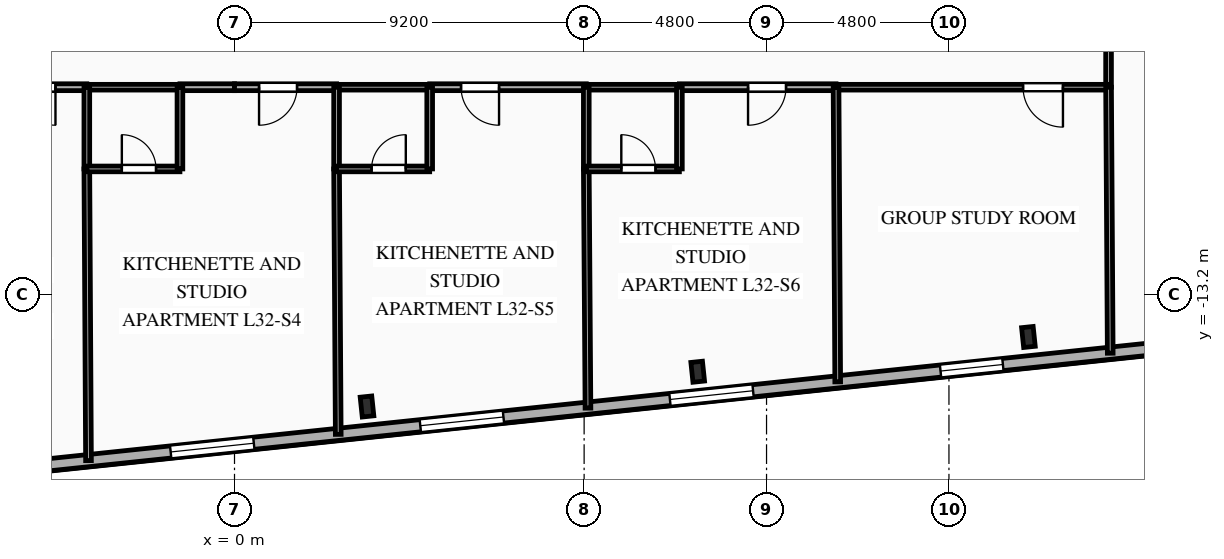
"""IFC4 building model, lengths in metres.
Left out: names, types, materials, properties, quantities, classifications, styles, units other than length and angle.
Written with IfcOpenShell. Run it as: python <this file> out.ifc"""

import sys

from ifc_helpers import new_model, si_unit, direction, frame, frame_2d, origin, origin_2d, place, context, subcontext, project, spatial, rectangle, i_section, extrude, element, fill, save


model = new_model("IFC4")
c1 = context("Model", 3, precision=1e-05, world=origin(), true_north=direction((0.0, 1.0)))
c2 = subcontext(c1, "Body", "Model", "MODEL_VIEW")
j1 = project(units=[si_unit("LENGTHUNIT", "METRE"), si_unit("PLANEANGLEUNIT", "RADIAN")], contexts=[c1])
p1 = place(None, origin())
s1 = spatial("IfcSite", under=j1, at=p1, CompositionType="ELEMENT")
p2 = place(p1, origin())
s2 = spatial("IfcBuilding", under=s1, at=p2, CompositionType="ELEMENT")
p3 = place(p2, frame((0.0, 0.0, 115.85)))
s3 = spatial("IfcBuildingStorey", under=s2, at=p3, CompositionType="ELEMENT", Elevation=115.85)
for number, where, z_axis, x_axis in (
    (1, (3.487, -16.151, 0.0), (0.0, 0.0, 1.0), (0.995, 0.105, 0.0)),
    (2, (12.189, -15.237, 0.0), (0.0, 0.0, 1.0), (0.995, 0.105, 0.0)),
    (3, (20.891, -14.322, 0.0), (0.0, 0.0, 1.0), (0.995, 0.105, 0.0)),
):
    element("IfcColumn", number, at=place(p3, frame(where, z_axis=z_axis, x_axis=x_axis)), inside=s3, PredefinedType="COLUMN", context=c2, shape_type="SweptSolid", body=[
        extrude(i_section(OverallWidth=0.306, OverallDepth=0.524, WebThickness=0.021, FlangeThickness=0.04, FilletRadius=0.027, at=origin_2d()), origin(), (0.0, 0.0, 1.0), 3.35),
    ])
p4 = place(p3, frame((30.307, -13.986, 0.0), z_axis=(0.0, 0.0, 1.0), x_axis=(-0.994521628355, -0.104531003701, 0.0)))
e4 = element("IfcWall", 4, at=p4, inside=s3, PredefinedType="SOLIDWALL", context=c2, shape_type="SweptSolid", body=[
    extrude(rectangle(XDim=53.8, YDim=0.32, at=frame_2d((26.9, 0.0))), origin(), (0.0, 0.0, 1.0), 3.045),
])
p5 = place(p4, frame((3.098, 0.0, 0.85)))
e5 = element("IfcOpeningElement", 5, at=p5, cuts=e4, PredefinedType="OPENING", context=c2, shape_type="SweptSolid", body=[
    extrude(rectangle(XDim=1.65, YDim=1.85, at=frame_2d((0.825, 0.925))), frame((0.0, 0.17, 0.0), z_axis=(0.0, -1.0, 0.0), x_axis=(1.0, 0.0, 0.0)), (0.0, 0.0, 1.0), 0.34),
])
p6 = place(p4, frame((10.143, 0.0, 0.85)))
e6 = element("IfcOpeningElement", 6, at=p6, cuts=e4, PredefinedType="OPENING", context=c2, shape_type="SweptSolid", body=[
    extrude(rectangle(XDim=1.65, YDim=1.85, at=frame_2d((0.825, 0.925))), frame((0.0, 0.17, 0.0), z_axis=(0.0, -1.0, 0.0), x_axis=(1.0, 0.0, 0.0)), (0.0, 0.0, 1.0), 0.34),
])
p7 = place(p4, frame((16.753, 0.0, 0.85)))
e7 = element("IfcOpeningElement", 7, at=p7, cuts=e4, PredefinedType="OPENING", context=c2, shape_type="SweptSolid", body=[
    extrude(rectangle(XDim=2.2, YDim=1.85, at=frame_2d((1.1, 0.925))), frame((0.0, 0.17, 0.0), z_axis=(0.0, -1.0, 0.0), x_axis=(1.0, 0.0, 0.0)), (0.0, 0.0, 1.0), 0.34),
])
p8 = place(p4, frame((23.358, 0.0, 0.85)))
e8 = element("IfcOpeningElement", 8, at=p8, cuts=e4, PredefinedType="OPENING", context=c2, shape_type="SweptSolid", body=[
    extrude(rectangle(XDim=2.2, YDim=1.85, at=frame_2d((1.1, 0.925))), frame((0.0, 0.17, 0.0), z_axis=(0.0, -1.0, 0.0), x_axis=(1.0, 0.0, 0.0)), (0.0, 0.0, 1.0), 0.34),
])
p9 = place(p4, frame((29.963, 0.0, 0.85)))
e9 = element("IfcOpeningElement", 9, at=p9, cuts=e4, PredefinedType="OPENING", context=c2, shape_type="SweptSolid", body=[
    extrude(rectangle(XDim=2.2, YDim=1.85, at=frame_2d((1.1, 0.925))), frame((0.0, 0.17, 0.0), z_axis=(0.0, -1.0, 0.0), x_axis=(1.0, 0.0, 0.0)), (0.0, 0.0, 1.0), 0.34),
])
p10 = place(p4, frame((36.568, 0.0, 0.85)))
e10 = element("IfcOpeningElement", 10, at=p10, cuts=e4, PredefinedType="OPENING", context=c2, shape_type="SweptSolid", body=[
    extrude(rectangle(XDim=2.2, YDim=1.85, at=frame_2d((1.1, 0.925))), frame((0.0, 0.17, 0.0), z_axis=(0.0, -1.0, 0.0), x_axis=(1.0, 0.0, 0.0)), (0.0, 0.0, 1.0), 0.34),
])
p11 = place(p4, frame((43.173, 0.0, 0.85)))
e11 = element("IfcOpeningElement", 11, at=p11, cuts=e4, PredefinedType="OPENING", context=c2, shape_type="SweptSolid", body=[
    extrude(rectangle(XDim=2.2, YDim=1.85, at=frame_2d((1.1, 0.925))), frame((0.0, 0.17, 0.0), z_axis=(0.0, -1.0, 0.0), x_axis=(1.0, 0.0, 0.0)), (0.0, 0.0, 1.0), 0.34),
])
p12 = place(p4, frame((49.653, 0.0, 0.85)))
e12 = element("IfcOpeningElement", 12, at=p12, cuts=e4, PredefinedType="OPENING", context=c2, shape_type="SweptSolid", body=[
    extrude(rectangle(XDim=1.65, YDim=1.85, at=frame_2d((0.825, 0.925))), frame((0.0, 0.17, 0.0), z_axis=(0.0, -1.0, 0.0), x_axis=(1.0, 0.0, 0.0)), (0.0, 0.0, 1.0), 0.34),
])
p13 = place(p3, frame((-3.886, -7.75, 0.0), z_axis=(0.0, 0.0, 1.0), x_axis=(-1.0, 0.0, 0.0)))
e13 = element("IfcWall", 13, at=p13, inside=s3, PredefinedType="PARTITIONING", context=c2, shape_type="SweptSolid", body=[
    extrude(rectangle(XDim=4.121, YDim=0.18, at=frame_2d((2.061, 0.0))), origin(), (0.0, 0.0, 1.0), 3.045),
])
p14 = place(p13, frame((0.825, 0.0, 0.0)))
e14 = element("IfcOpeningElement", 14, at=p14, cuts=e13, PredefinedType="OPENING", context=c2, shape_type="SweptSolid", body=[
    extrude(rectangle(XDim=1.0, YDim=2.15, at=frame_2d((0.5, 1.075))), frame((0.0, 0.1, 0.0), z_axis=(0.0, -1.0, 0.0), x_axis=(1.0, 0.0, 0.0)), (0.0, 0.0, 1.0), 0.2),
])
p15 = place(p3, frame((0.0, -7.75, 0.0), z_axis=(0.0, 0.0, 1.0), x_axis=(-1.0, 0.0, 0.0)))
e15 = element("IfcWall", 15, at=p15, inside=s3, PredefinedType="PARTITIONING", context=c2, shape_type="SweptSolid", body=[
    extrude(rectangle(XDim=1.436, YDim=0.18, at=frame_2d((0.718, 0.0))), origin(), (0.0, 0.0, 1.0), 3.045),
])
p16 = place(p3, frame((-1.436, -7.75, 0.0), z_axis=(0.0, 0.0, 1.0), x_axis=(-1.0, 0.0, 0.0)))
e16 = element("IfcWall", 16, at=p16, inside=s3, PredefinedType="PLUMBINGWALL", context=c2, shape_type="SweptSolid", body=[
    extrude(rectangle(XDim=2.45, YDim=0.15, at=frame_2d((1.225, 0.0))), origin(), (0.0, 0.0, 1.0), 3.045),
])
p17 = place(p3, frame((23.0, -5.6, 0.0), z_axis=(0.0, 0.0, 1.0), x_axis=(0.0, -1.0, 0.0)))
e17 = element("IfcWall", 17, at=p17, inside=s3, PredefinedType="PARTITIONING", context=c2, shape_type="SweptSolid", body=[
    extrude(rectangle(XDim=2.15, YDim=0.15, at=frame_2d((1.075, 0.0))), origin(), (0.0, 0.0, 1.0), 3.045),
])
p18 = place(p3, frame((2.686, -7.75, 0.0), z_axis=(0.0, 0.0, 1.0), x_axis=(-1.0, 0.0, 0.0)))
e18 = element("IfcWall", 18, at=p18, inside=s3, PredefinedType="PARTITIONING", context=c2, shape_type="SweptSolid", body=[
    extrude(rectangle(XDim=2.686, YDim=0.18, at=frame_2d((1.343, 0.0))), origin(), (0.0, 0.0, 1.0), 3.045),
])
p19 = place(p18, frame((1.04, 0.0, 0.0)))
e19 = element("IfcOpeningElement", 19, at=p19, cuts=e18, PredefinedType="OPENING", context=c2, shape_type="SweptSolid", body=[
    extrude(rectangle(XDim=1.0, YDim=2.15, at=frame_2d((0.5, 1.075))), frame((0.0, 0.1, 0.0), z_axis=(0.0, -1.0, 0.0), x_axis=(1.0, 0.0, 0.0)), (0.0, 0.0, 1.0), 0.2),
])
p20 = place(p3, frame((9.257, -7.75, 0.0), z_axis=(0.0, 0.0, 1.0), x_axis=(-1.0, 0.0, 0.0)))
e20 = element("IfcWall", 20, at=p20, inside=s3, PredefinedType="PARTITIONING", context=c2, shape_type="SweptSolid", body=[
    extrude(rectangle(XDim=4.121, YDim=0.18, at=frame_2d((2.061, 0.0))), origin(), (0.0, 0.0, 1.0), 3.045),
])
p21 = place(p20, frame((2.296, 0.0, 0.0)))
e21 = element("IfcOpeningElement", 21, at=p21, cuts=e20, PredefinedType="OPENING", context=c2, shape_type="SweptSolid", body=[
    extrude(rectangle(XDim=1.0, YDim=2.15, at=frame_2d((0.5, 1.075))), frame((0.0, 0.1, 0.0), z_axis=(0.0, -1.0, 0.0), x_axis=(1.0, 0.0, 0.0)), (0.0, 0.0, 1.0), 0.2),
])
p22 = place(p3, frame((5.136, -7.75, 0.0), z_axis=(0.0, 0.0, 1.0), x_axis=(-1.0, 0.0, 0.0)))
e22 = element("IfcWall", 22, at=p22, inside=s3, PredefinedType="PLUMBINGWALL", context=c2, shape_type="SweptSolid", body=[
    extrude(rectangle(XDim=2.45, YDim=0.15, at=frame_2d((1.225, 0.0))), origin(), (0.0, 0.0, 1.0), 3.045),
])
p23 = place(p3, frame((15.829, -7.75, 0.0), z_axis=(0.0, 0.0, 1.0), x_axis=(-1.0, 0.0, 0.0)))
e23 = element("IfcWall", 23, at=p23, inside=s3, PredefinedType="PARTITIONING", context=c2, shape_type="SweptSolid", body=[
    extrude(rectangle(XDim=4.122, YDim=0.18, at=frame_2d((2.061, 0.0))), origin(), (0.0, 0.0, 1.0), 3.045),
])
p24 = place(p23, frame((1.316, 0.0, 0.0)))
e24 = element("IfcOpeningElement", 24, at=p24, cuts=e23, PredefinedType="OPENING", context=c2, shape_type="SweptSolid", body=[
    extrude(rectangle(XDim=1.0, YDim=2.15, at=frame_2d((0.5, 1.075))), frame((0.0, 0.1, 0.0), z_axis=(0.0, -1.0, 0.0), x_axis=(1.0, 0.0, 0.0)), (0.0, 0.0, 1.0), 0.2),
])
p25 = place(p3, frame((11.707, -7.75, 0.0), z_axis=(0.0, 0.0, 1.0), x_axis=(-1.0, 0.0, 0.0)))
e25 = element("IfcWall", 25, at=p25, inside=s3, PredefinedType="PLUMBINGWALL", context=c2, shape_type="SweptSolid", body=[
    extrude(rectangle(XDim=2.45, YDim=0.15, at=frame_2d((1.225, 0.0))), origin(), (0.0, 0.0, 1.0), 3.045),
])
p26 = place(p3, frame((23.0, -7.75, 0.0), z_axis=(0.0, 0.0, 1.0), x_axis=(-1.0, 0.0, 0.0)))
e26 = element("IfcWall", 26, at=p26, inside=s3, PredefinedType="PARTITIONING", context=c2, shape_type="SweptSolid", body=[
    extrude(rectangle(XDim=7.171, YDim=0.15, at=frame_2d((3.585, 0.0))), origin(), (0.0, 0.0, 1.0), 3.045),
])
p27 = place(p26, frame((1.2, 0.0, 0.0)))
e27 = element("IfcOpeningElement", 27, at=p27, cuts=e26, PredefinedType="OPENING", context=c2, shape_type="SweptSolid", body=[
    extrude(rectangle(XDim=1.05, YDim=2.15, at=frame_2d((0.525, 1.075))), frame((0.0, 0.085, 0.0), z_axis=(0.0, -1.0, 0.0), x_axis=(1.0, 0.0, 0.0)), (0.0, 0.0, 1.0), 0.17),
])
p28 = place(p3, frame((23.044, -14.749, 0.0), z_axis=(0.0, 0.0, 1.0), x_axis=(-0.006278653971, 0.999980289058, 0.0)))
e28 = element("IfcWall", 28, at=p28, inside=s3, PredefinedType="PARTITIONING", context=c2, shape_type="SweptSolid", body=[
    extrude(rectangle(XDim=6.999, YDim=0.15, at=frame_2d((3.5, 0.0))), origin(), (0.0, 0.0, 1.0), 3.045),
])
p29 = place(p3, frame((-3.886, -9.9, 0.0), z_axis=(0.0, 0.0, 1.0), x_axis=(0.005725643334, -0.99998360837, 0.0)))
e29 = element("IfcWall", 29, at=p29, inside=s3, PredefinedType="PARTITIONING", context=c2, shape_type="SweptSolid", body=[
    extrude(rectangle(XDim=7.675, YDim=0.15, at=frame_2d((3.838, 0.0))), origin(), (0.0, 0.0, 1.0), 3.045),
])
p30 = place(p3, frame((-3.886, -7.75, 0.0), z_axis=(0.0, 0.0, 1.0), x_axis=(0.0, -1.0, 0.0)))
e30 = element("IfcWall", 30, at=p30, inside=s3, PredefinedType="PLUMBINGWALL", context=c2, shape_type="SweptSolid", body=[
    extrude(rectangle(XDim=2.15, YDim=0.15, at=frame_2d((1.075, 0.0))), origin(), (0.0, 0.0, 1.0), 3.045),
])
p31 = place(p3, frame((-3.886, -9.9, 0.0), z_axis=(0.0, 0.0, 1.0), x_axis=(1.0, 0.0, 0.0)))
e31 = element("IfcWall", 31, at=p31, inside=s3, PredefinedType="PLUMBINGWALL", context=c2, shape_type="SweptSolid", body=[
    extrude(rectangle(XDim=2.45, YDim=0.15, at=frame_2d((1.225, 0.0))), origin(), (0.0, 0.0, 1.0), 3.045),
])
p32 = place(p31, frame((0.921, 0.0, 0.0)))
e32 = element("IfcOpeningElement", 32, at=p32, cuts=e31, PredefinedType="OPENING", context=c2, shape_type="SweptSolid", body=[
    extrude(rectangle(XDim=0.9, YDim=2.1, at=frame_2d((0.45, 1.05))), frame((0.0, 0.085, 0.0), z_axis=(0.0, -1.0, 0.0), x_axis=(1.0, 0.0, 0.0)), (0.0, 0.0, 1.0), 0.17),
])
p33 = place(p3, frame((-1.436, -9.9, 0.0), z_axis=(0.0, 0.0, 1.0), x_axis=(0.0, 1.0, 0.0)))
e33 = element("IfcWall", 33, at=p33, inside=s3, PredefinedType="PLUMBINGWALL", context=c2, shape_type="SweptSolid", body=[
    extrude(rectangle(XDim=2.15, YDim=0.15, at=frame_2d((1.075, 0.0))), origin(), (0.0, 0.0, 1.0), 3.045),
])
p34 = place(p3, frame((2.686, -9.9, 0.0), z_axis=(0.0, 0.0, 1.0), x_axis=(0.006291821768, -0.999980206294, 0.0)))
e34 = element("IfcWall", 34, at=p34, inside=s3, PredefinedType="PARTITIONING", context=c2, shape_type="SweptSolid", body=[
    extrude(rectangle(XDim=6.985, YDim=0.15, at=frame_2d((3.492, 0.0))), origin(), (0.0, 0.0, 1.0), 3.045),
])
p35 = place(p3, frame((2.686, -7.75, 0.0), z_axis=(0.0, 0.0, 1.0), x_axis=(0.0, -1.0, 0.0)))
e35 = element("IfcWall", 35, at=p35, inside=s3, PredefinedType="PLUMBINGWALL", context=c2, shape_type="SweptSolid", body=[
    extrude(rectangle(XDim=2.15, YDim=0.15, at=frame_2d((1.075, 0.0))), origin(), (0.0, 0.0, 1.0), 3.045),
])
p36 = place(p3, frame((2.686, -9.9, 0.0), z_axis=(0.0, 0.0, 1.0), x_axis=(1.0, 0.0, 0.0)))
e36 = element("IfcWall", 36, at=p36, inside=s3, PredefinedType="PLUMBINGWALL", context=c2, shape_type="SweptSolid", body=[
    extrude(rectangle(XDim=2.45, YDim=0.15, at=frame_2d((1.225, 0.0))), origin(), (0.0, 0.0, 1.0), 3.045),
])
p37 = place(p36, frame((0.921, 0.0, 0.0)))
e37 = element("IfcOpeningElement", 37, at=p37, cuts=e36, PredefinedType="OPENING", context=c2, shape_type="SweptSolid", body=[
    extrude(rectangle(XDim=0.9, YDim=2.1, at=frame_2d((0.45, 1.05))), frame((0.0, 0.085, 0.0), z_axis=(0.0, -1.0, 0.0), x_axis=(1.0, 0.0, 0.0)), (0.0, 0.0, 1.0), 0.17),
])
p38 = place(p3, frame((5.136, -9.9, 0.0), z_axis=(0.0, 0.0, 1.0), x_axis=(0.0, 1.0, 0.0)))
e38 = element("IfcWall", 38, at=p38, inside=s3, PredefinedType="PLUMBINGWALL", context=c2, shape_type="SweptSolid", body=[
    extrude(rectangle(XDim=2.15, YDim=0.15, at=frame_2d((1.075, 0.0))), origin(), (0.0, 0.0, 1.0), 3.045),
])
p39 = place(p3, frame((9.257, -9.9, 0.0), z_axis=(0.0, 0.0, 1.0), x_axis=(0.006943468909, -0.999975893829, 0.0)))
e39 = element("IfcWall", 39, at=p39, inside=s3, PredefinedType="PARTITIONING", context=c2, shape_type="SweptSolid", body=[
    extrude(rectangle(XDim=6.294, YDim=0.15, at=frame_2d((3.147, 0.0))), origin(), (0.0, 0.0, 1.0), 3.045),
])
p40 = place(p3, frame((9.257, -7.75, 0.0), z_axis=(0.0, 0.0, 1.0), x_axis=(0.0, -1.0, 0.0)))
e40 = element("IfcWall", 40, at=p40, inside=s3, PredefinedType="PLUMBINGWALL", context=c2, shape_type="SweptSolid", body=[
    extrude(rectangle(XDim=2.15, YDim=0.15, at=frame_2d((1.075, 0.0))), origin(), (0.0, 0.0, 1.0), 3.045),
])
p41 = place(p3, frame((9.257, -9.9, 0.0), z_axis=(0.0, 0.0, 1.0), x_axis=(1.0, 0.0, 0.0)))
e41 = element("IfcWall", 41, at=p41, inside=s3, PredefinedType="PLUMBINGWALL", context=c2, shape_type="SweptSolid", body=[
    extrude(rectangle(XDim=2.45, YDim=0.15, at=frame_2d((1.225, 0.0))), origin(), (0.0, 0.0, 1.0), 3.045),
])
p42 = place(p41, frame((0.921, 0.0, 0.0)))
e42 = element("IfcOpeningElement", 42, at=p42, cuts=e41, PredefinedType="OPENING", context=c2, shape_type="SweptSolid", body=[
    extrude(rectangle(XDim=0.9, YDim=2.1, at=frame_2d((0.45, 1.05))), frame((0.0, 0.085, 0.0), z_axis=(0.0, -1.0, 0.0), x_axis=(1.0, 0.0, 0.0)), (0.0, 0.0, 1.0), 0.17),
])
p43 = place(p3, frame((11.707, -9.9, 0.0), z_axis=(0.0, 0.0, 1.0), x_axis=(0.0, 1.0, 0.0)))
e43 = element("IfcWall", 43, at=p43, inside=s3, PredefinedType="PLUMBINGWALL", context=c2, shape_type="SweptSolid", body=[
    extrude(rectangle(XDim=2.15, YDim=0.15, at=frame_2d((1.075, 0.0))), origin(), (0.0, 0.0, 1.0), 3.045),
])
p44 = place(p3, frame((15.829, -7.75, 0.0), z_axis=(0.0, 0.0, 1.0), x_axis=(0.00563681802, -0.999984113015, 0.0)))
e44 = element("IfcWall", 44, at=p44, inside=s3, PredefinedType="PARTITIONING", context=c2, shape_type="SweptSolid", body=[
    extrude(rectangle(XDim=7.753, YDim=0.15, at=frame_2d((3.876, 0.0))), origin(), (0.0, 0.0, 1.0), 3.045),
])
p45 = place(p6, origin())
e45 = element("IfcWindow", 45, at=p45, inside=s3, PartitioningType="SINGLE_PANEL", PredefinedType="WINDOW", context=c2, shape_type="SweptSolid", body=[
    extrude(rectangle(XDim=1.65, YDim=1.85, at=frame_2d((0.825, 0.925))), frame((0.0, 0.03, 0.0), z_axis=(0.0, -1.0, 0.0), x_axis=(1.0, 0.0, 0.0)), (0.0, 0.0, 1.0), 0.06),
])
fill(e6, e45)
p46 = place(p7, origin())
e46 = element("IfcWindow", 46, at=p46, inside=s3, PartitioningType="SINGLE_PANEL", PredefinedType="WINDOW", context=c2, shape_type="SweptSolid", body=[
    extrude(rectangle(XDim=2.2, YDim=1.85, at=frame_2d((1.1, 0.925))), frame((0.0, 0.03, 0.0), z_axis=(0.0, -1.0, 0.0), x_axis=(1.0, 0.0, 0.0)), (0.0, 0.0, 1.0), 0.06),
])
fill(e7, e46)
p47 = place(p8, origin())
e47 = element("IfcWindow", 47, at=p47, inside=s3, PartitioningType="SINGLE_PANEL", PredefinedType="WINDOW", context=c2, shape_type="SweptSolid", body=[
    extrude(rectangle(XDim=2.2, YDim=1.85, at=frame_2d((1.1, 0.925))), frame((0.0, 0.03, 0.0), z_axis=(0.0, -1.0, 0.0), x_axis=(1.0, 0.0, 0.0)), (0.0, 0.0, 1.0), 0.06),
])
fill(e8, e47)
p48 = place(p9, origin())
e48 = element("IfcWindow", 48, at=p48, inside=s3, PartitioningType="SINGLE_PANEL", PredefinedType="WINDOW", context=c2, shape_type="SweptSolid", body=[
    extrude(rectangle(XDim=2.2, YDim=1.85, at=frame_2d((1.1, 0.925))), frame((0.0, 0.03, 0.0), z_axis=(0.0, -1.0, 0.0), x_axis=(1.0, 0.0, 0.0)), (0.0, 0.0, 1.0), 0.06),
])
fill(e9, e48)
p49 = place(p14, origin())
e49 = element("IfcDoor", 49, at=p49, inside=s3, OperationType="SINGLE_SWING_LEFT", PredefinedType="DOOR", context=c2, shape_type="SweptSolid", body=[
    extrude(rectangle(XDim=1.0, YDim=2.15, at=frame_2d((0.5, 1.075))), frame((0.0, 0.025, 0.0), z_axis=(0.0, -1.0, 0.0), x_axis=(1.0, 0.0, 0.0)), (0.0, 0.0, 1.0), 0.05),
])
fill(e14, e49)
p50 = place(p19, origin())
e50 = element("IfcDoor", 50, at=p50, inside=s3, OperationType="SINGLE_SWING_RIGHT", PredefinedType="DOOR", context=c2, shape_type="SweptSolid", body=[
    extrude(rectangle(XDim=1.0, YDim=2.15, at=frame_2d((0.5, 1.075))), frame((0.0, 0.025, 0.0), z_axis=(0.0, -1.0, 0.0), x_axis=(1.0, 0.0, 0.0)), (0.0, 0.0, 1.0), 0.05),
])
fill(e19, e50)
p51 = place(p21, origin())
e51 = element("IfcDoor", 51, at=p51, inside=s3, OperationType="SINGLE_SWING_LEFT", PredefinedType="DOOR", context=c2, shape_type="SweptSolid", body=[
    extrude(rectangle(XDim=1.0, YDim=2.15, at=frame_2d((0.5, 1.075))), frame((0.0, 0.025, 0.0), z_axis=(0.0, -1.0, 0.0), x_axis=(1.0, 0.0, 0.0)), (0.0, 0.0, 1.0), 0.05),
])
fill(e21, e51)
p52 = place(p24, origin())
e52 = element("IfcDoor", 52, at=p52, inside=s3, OperationType="SINGLE_SWING_RIGHT", PredefinedType="DOOR", context=c2, shape_type="SweptSolid", body=[
    extrude(rectangle(XDim=1.0, YDim=2.15, at=frame_2d((0.5, 1.075))), frame((0.0, 0.025, 0.0), z_axis=(0.0, -1.0, 0.0), x_axis=(1.0, 0.0, 0.0)), (0.0, 0.0, 1.0), 0.05),
])
fill(e24, e52)
p53 = place(p27, origin())
e53 = element("IfcDoor", 53, at=p53, inside=s3, OperationType="SINGLE_SWING_LEFT", PredefinedType="DOOR", context=c2, shape_type="SweptSolid", body=[
    extrude(rectangle(XDim=1.05, YDim=2.15, at=frame_2d((0.525, 1.075))), frame((0.0, 0.025, 0.0), z_axis=(0.0, -1.0, 0.0), x_axis=(1.0, 0.0, 0.0)), (0.0, 0.0, 1.0), 0.05),
])
fill(e27, e53)
p54 = place(p32, origin())
e54 = element("IfcDoor", 54, at=p54, inside=s3, OperationType="SINGLE_SWING_LEFT", PredefinedType="DOOR", context=c2, shape_type="SweptSolid", body=[
    extrude(rectangle(XDim=0.9, YDim=2.1, at=frame_2d((0.45, 1.05))), frame((0.0, 0.025, 0.0), z_axis=(0.0, -1.0, 0.0), x_axis=(1.0, 0.0, 0.0)), (0.0, 0.0, 1.0), 0.05),
])
fill(e32, e54)
p55 = place(p37, origin())
e55 = element("IfcDoor", 55, at=p55, inside=s3, OperationType="SINGLE_SWING_RIGHT", PredefinedType="DOOR", context=c2, shape_type="SweptSolid", body=[
    extrude(rectangle(XDim=0.9, YDim=2.1, at=frame_2d((0.45, 1.05))), frame((0.0, 0.025, 0.0), z_axis=(0.0, -1.0, 0.0), x_axis=(1.0, 0.0, 0.0)), (0.0, 0.0, 1.0), 0.05),
])
fill(e37, e55)
p56 = place(p42, origin())
e56 = element("IfcDoor", 56, at=p56, inside=s3, OperationType="SINGLE_SWING_LEFT", PredefinedType="DOOR", context=c2, shape_type="SweptSolid", body=[
    extrude(rectangle(XDim=0.9, YDim=2.1, at=frame_2d((0.45, 1.05))), frame((0.0, 0.025, 0.0), z_axis=(0.0, -1.0, 0.0), x_axis=(1.0, 0.0, 0.0)), (0.0, 0.0, 1.0), 0.05),
])
fill(e42, e56)
save(model, sys.argv[1])
